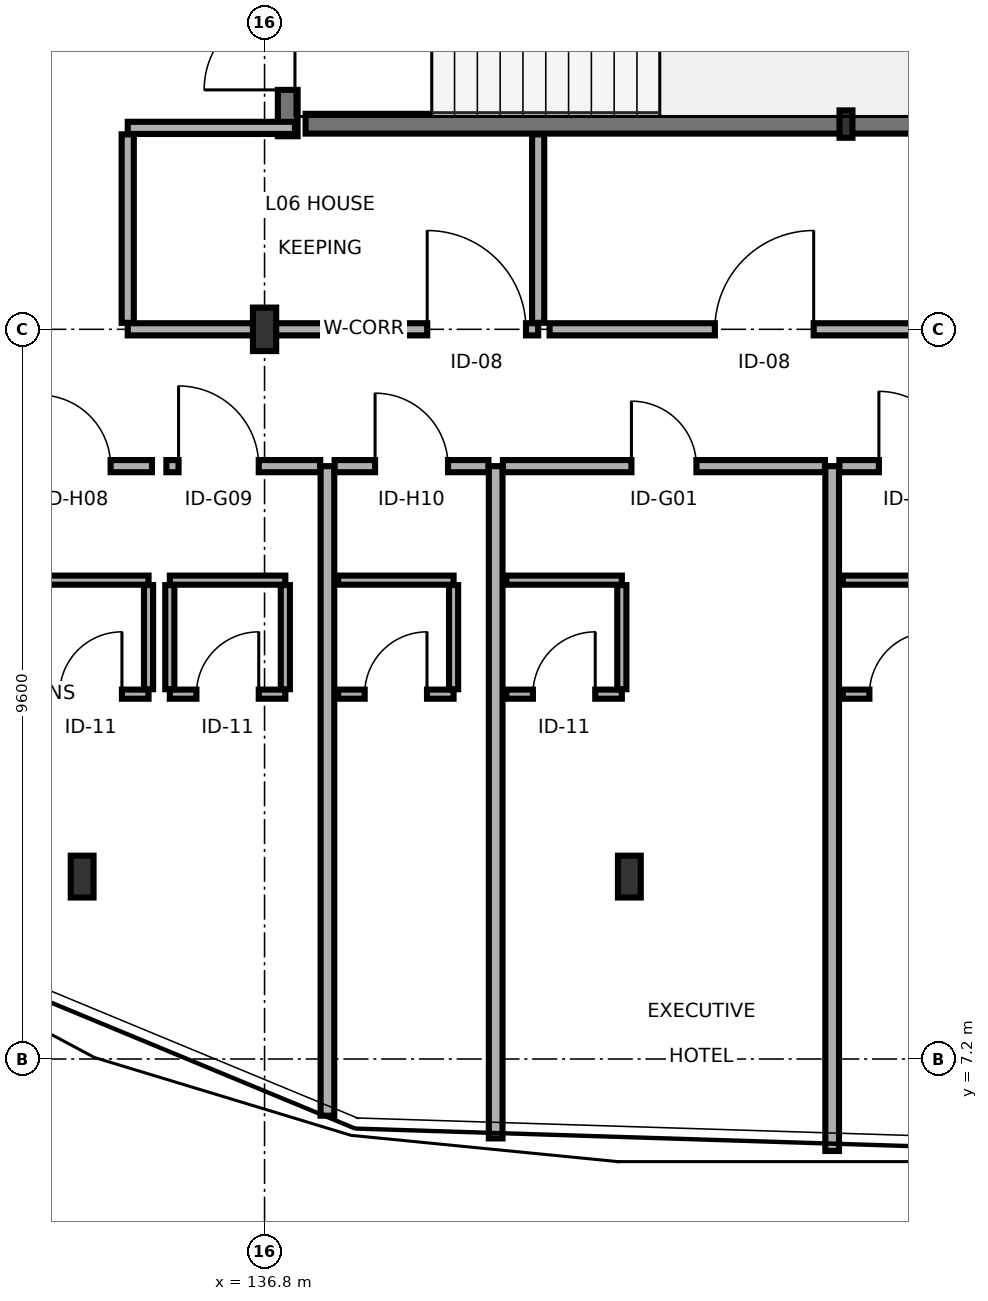
"""IFC4 building model, lengths in metres.
Left out: names, types, materials, properties, quantities, classifications, styles, units other than length and angle.
Written with IfcOpenShell. Run it as: python <this file> out.ifc"""

import sys

from ifc_helpers import new_model, si_unit, direction, frame, frame_2d, origin, origin_2d, place, context, subcontext, project, spatial, rectangle, i_section, extrude, element, fill, save


model = new_model("IFC4")
c1 = context("Model", 3, precision=1e-05, world=origin(), true_north=direction((0.0, 1.0)))
c2 = subcontext(c1, "Body", "Model", "MODEL_VIEW")
j1 = project(units=[si_unit("LENGTHUNIT", "METRE"), si_unit("PLANEANGLEUNIT", "RADIAN")], contexts=[c1])
p1 = place(None, origin())
s1 = spatial("IfcSite", under=j1, at=p1, CompositionType="ELEMENT")
p2 = place(p1, origin())
s2 = spatial("IfcBuilding", under=s1, at=p2, CompositionType="ELEMENT")
p3 = place(p2, frame((0.0, 0.0, 21.5)))
s3 = spatial("IfcBuildingStorey", under=s2, at=p3, CompositionType="ELEMENT", Elevation=21.5)
p4 = place(p3, frame((136.8, 16.8, 0.0), z_axis=(0.0, 0.0, 1.0), x_axis=(1.0, 0.0, 0.0)))
e1 = element("IfcColumn", 1, at=p4, inside=s3, PredefinedType="COLUMN", context=c2, shape_type="SweptSolid", body=[
    extrude(i_section(OverallWidth=0.306, OverallDepth=0.572, WebThickness=0.021, FlangeThickness=0.04, FilletRadius=0.027, at=origin_2d()), origin(), (0.0, 0.0, 1.0), 3.4),
])
p5 = place(p3, frame((144.45, 19.5, 0.0), z_axis=(0.0, 0.0, 1.0), x_axis=(1.0, 0.0, 0.0)))
e2 = element("IfcColumn", 2, at=p5, inside=s3, PredefinedType="PILASTER", context=c2, shape_type="SweptSolid", body=[
    extrude(i_section(OverallWidth=0.17, OverallDepth=0.36, WebThickness=0.008, FlangeThickness=0.013, FilletRadius=0.018, at=origin_2d()), origin(), (0.0, 0.0, 1.0), 3.4),
])
for number, where, z_axis, x_axis in (
    (3, (134.4, 9.6, 0.0), (0.0, 0.0, 1.0), (1.0, 0.0, 0.0)),
    (4, (141.6, 9.6, 0.0), (0.0, 0.0, 1.0), (1.0, 0.0, 0.0)),
):
    element("IfcColumn", number, at=place(p3, frame(where, z_axis=z_axis, x_axis=x_axis)), inside=s3, PredefinedType="COLUMN", context=c2, shape_type="SweptSolid", body=[
        extrude(i_section(OverallWidth=0.3, OverallDepth=0.55, WebThickness=0.015, FlangeThickness=0.029, FilletRadius=0.027, at=origin_2d()), origin(), (0.0, 0.0, 1.0), 3.4),
    ])
p6 = place(p3, frame((137.105, 19.34, 0.0), z_axis=(0.0, 0.0, 1.0), x_axis=(0.0, 1.0, 0.0)))
e5 = element("IfcWall", 5, at=p6, inside=s3, PredefinedType="SHEAR", context=c2, shape_type="SweptSolid", body=[
    extrude(rectangle(XDim=4.27, YDim=0.26, at=frame_2d((2.135, 0.0))), origin(), (0.0, 0.0, 1.0), 3.195),
])
p7 = place(p6, frame((0.61, 0.0, 0.0)))
e6 = element("IfcOpeningElement", 6, at=p7, cuts=e5, PredefinedType="OPENING", context=c2, shape_type="SweptSolid", body=[
    extrude(rectangle(XDim=1.1, YDim=2.2, at=frame_2d((0.55, 1.1))), frame((0.0, 0.14, 0.0), z_axis=(0.0, -1.0, 0.0), x_axis=(1.0, 0.0, 0.0)), (0.0, 0.0, 1.0), 0.28),
])
p8 = place(p3, frame((137.34, 19.505, 0.0), z_axis=(0.0, 0.0, 1.0), x_axis=(1.0, 0.0, 0.0)))
e7 = element("IfcWall", 7, at=p8, inside=s3, PredefinedType="SHEAR", context=c2, shape_type="SweptSolid", body=[
    extrude(rectangle(XDim=8.52, YDim=0.26, at=frame_2d((4.26, 0.0))), origin(), (0.0, 0.0, 1.0), 3.195),
])
p9 = place(p3, frame((135.0, 16.8, 0.0), z_axis=(0.0, 0.0, 1.0), x_axis=(1.0, 0.0, 0.0)))
e8 = element("IfcWall", 8, at=p9, inside=s3, PredefinedType="PARTITIONING", context=c2, shape_type="SweptSolid", body=[
    extrude(rectangle(XDim=5.4, YDim=0.16, at=frame_2d((2.7, 0.0))), origin(), (0.0, 0.0, 1.0), 2.73),
])
p10 = place(p9, frame((3.94, 0.0, 0.0)))
e9 = element("IfcOpeningElement", 9, at=p10, cuts=e8, PredefinedType="OPENING", context=c2, shape_type="SweptSolid", body=[
    extrude(rectangle(XDim=1.3, YDim=2.2, at=frame_2d((0.65, 1.1))), frame((0.0, 0.09, 0.0), z_axis=(0.0, -1.0, 0.0), x_axis=(1.0, 0.0, 0.0)), (0.0, 0.0, 1.0), 0.18),
])
for number, where, z_axis, x_axis in (
    (10, (135.0, 16.885, 0.0), (0.0, 0.0, 1.0), (0.0, 1.0, 0.0)),
    (11, (140.4, 16.885, 0.0), (0.0, 0.0, 1.0), (0.0, 1.0, 0.0)),
):
    element("IfcWall", number, at=place(p3, frame(where, z_axis=z_axis, x_axis=x_axis)), inside=s3, PredefinedType="PARTITIONING", context=c2, shape_type="SweptSolid", body=[
        extrude(rectangle(XDim=2.48, YDim=0.16, at=frame_2d((1.24, 0.0))), origin(), (0.0, 0.0, 1.0), 2.73),
    ])
p11 = place(p3, frame((135.0, 19.45, 0.0), z_axis=(0.0, 0.0, 1.0), x_axis=(1.0, 0.0, 0.0)))
e12 = element("IfcWall", 12, at=p11, inside=s3, PredefinedType="PARTITIONING", context=c2, shape_type="SweptSolid", body=[
    extrude(rectangle(XDim=2.2, YDim=0.16, at=frame_2d((1.1, 0.0))), origin(), (0.0, 0.0, 1.0), 2.73),
])
p12 = place(p3, frame((140.55, 16.8, 0.0), z_axis=(0.0, 0.0, 1.0), x_axis=(1.0, 0.0, 0.0)))
e13 = element("IfcWall", 13, at=p12, inside=s3, PredefinedType="PARTITIONING", context=c2, shape_type="SweptSolid", body=[
    extrude(rectangle(XDim=5.65, YDim=0.16, at=frame_2d((2.825, 0.0))), origin(), (0.0, 0.0, 1.0), 2.73),
])
p13 = place(p12, frame((2.175, 0.0, 0.0)))
e14 = element("IfcOpeningElement", 14, at=p13, cuts=e13, PredefinedType="OPENING", context=c2, shape_type="SweptSolid", body=[
    extrude(rectangle(XDim=1.3, YDim=2.2, at=frame_2d((0.65, 1.1))), frame((0.0, 0.09, 0.0), z_axis=(0.0, -1.0, 0.0), x_axis=(1.0, 0.0, 0.0)), (0.0, 0.0, 1.0), 0.18),
])
p14 = place(p3, frame((133.295, 15.0, 0.0), z_axis=(0.0, 0.0, 1.0), x_axis=(1.0, 0.0, 0.0)))
e15 = element("IfcWall", 15, at=p14, inside=s3, PredefinedType="PARTITIONING", context=c2, shape_type="SweptSolid", body=[
    extrude(rectangle(XDim=2.024, YDim=0.16, at=frame_2d((1.012, 0.0))), origin(), (0.0, 0.0, 1.0), 3.195),
])
p15 = place(p14, frame((0.544, 0.0, 0.0)))
e16 = element("IfcOpeningElement", 16, at=p15, cuts=e15, PredefinedType="OPENING", context=c2, shape_type="SweptSolid", body=[
    extrude(rectangle(XDim=0.936, YDim=2.07, at=frame_2d((0.468, 1.035))), frame((0.0, 0.09, 0.0), z_axis=(0.0, -1.0, 0.0), x_axis=(1.0, 0.0, 0.0)), (0.0, 0.0, 1.0), 0.18),
])
p16 = place(p3, frame((133.754, 12.0, 0.0), z_axis=(0.0, 0.0, 1.0), x_axis=(1.0, 0.0, 0.0)))
e17 = element("IfcWall", 17, at=p16, inside=s3, PredefinedType="PARTITIONING", context=c2, shape_type="SweptSolid", body=[
    extrude(rectangle(XDim=1.52, YDim=0.12, at=frame_2d((0.76, 0.0))), origin(), (0.0, 0.0, 1.0), 2.73),
])
p17 = place(p16, frame((0.35, 0.0, 0.0)))
e18 = element("IfcOpeningElement", 18, at=p17, cuts=e17, PredefinedType="OPENING", context=c2, shape_type="SweptSolid", body=[
    extrude(rectangle(XDim=0.82, YDim=2.08, at=frame_2d((0.41, 1.04))), frame((0.0, 0.07, 0.0), z_axis=(0.0, -1.0, 0.0), x_axis=(1.0, 0.0, 0.0)), (0.0, 0.0, 1.0), 0.14),
])
p18 = place(p3, frame((133.754, 13.5, 0.0), z_axis=(0.0, 0.0, 1.0), x_axis=(1.0, 0.0, 0.0)))
e19 = element("IfcWall", 19, at=p18, inside=s3, PredefinedType="PARTITIONING", context=c2, shape_type="SweptSolid", body=[
    extrude(rectangle(XDim=1.52, YDim=0.12, at=frame_2d((0.76, 0.0))), origin(), (0.0, 0.0, 1.0), 3.195),
])
p19 = place(p3, frame((135.274, 12.065, 0.0), z_axis=(0.0, 0.0, 1.0), x_axis=(0.0, 1.0, 0.0)))
e20 = element("IfcWall", 20, at=p19, inside=s3, PredefinedType="PARTITIONING", context=c2, shape_type="SweptSolid", body=[
    extrude(rectangle(XDim=1.37, YDim=0.12, at=frame_2d((0.685, 0.0))), origin(), (0.0, 0.0, 1.0), 2.73),
])
p20 = place(p3, frame((135.509, 15.0, 0.0), z_axis=(0.0, 0.0, 1.0), x_axis=(1.0, 0.0, 0.0)))
e21 = element("IfcWall", 21, at=p20, inside=s3, PredefinedType="PARTITIONING", context=c2, shape_type="SweptSolid", body=[
    extrude(rectangle(XDim=2.024, YDim=0.16, at=frame_2d((1.012, 0.0))), origin(), (0.0, 0.0, 1.0), 2.73),
])
p21 = place(p20, frame((0.16, 0.0, 0.0)))
e22 = element("IfcOpeningElement", 22, at=p21, cuts=e21, PredefinedType="OPENING", context=c2, shape_type="SweptSolid", body=[
    extrude(rectangle(XDim=1.055, YDim=2.05, at=frame_2d((0.527, 1.025))), frame((0.0, 0.09, 0.0), z_axis=(0.0, -1.0, 0.0), x_axis=(1.0, 0.0, 0.0)), (0.0, 0.0, 1.0), 0.18),
])
p22 = place(p3, frame((135.554, 12.0, 0.0), z_axis=(0.0, 0.0, 1.0), x_axis=(1.0, 0.0, 0.0)))
e23 = element("IfcWall", 23, at=p22, inside=s3, PredefinedType="PARTITIONING", context=c2, shape_type="SweptSolid", body=[
    extrude(rectangle(XDim=1.52, YDim=0.12, at=frame_2d((0.76, 0.0))), origin(), (0.0, 0.0, 1.0), 3.195),
])
p23 = place(p22, frame((0.35, 0.0, 0.0)))
e24 = element("IfcOpeningElement", 24, at=p23, cuts=e23, PredefinedType="OPENING", context=c2, shape_type="SweptSolid", body=[
    extrude(rectangle(XDim=0.82, YDim=2.08, at=frame_2d((0.41, 1.04))), frame((0.0, 0.07, 0.0), z_axis=(0.0, -1.0, 0.0), x_axis=(1.0, 0.0, 0.0)), (0.0, 0.0, 1.0), 0.14),
])
p24 = place(p3, frame((135.554, 13.5, 0.0), z_axis=(0.0, 0.0, 1.0), x_axis=(1.0, 0.0, 0.0)))
e25 = element("IfcWall", 25, at=p24, inside=s3, PredefinedType="PARTITIONING", context=c2, shape_type="SweptSolid", body=[
    extrude(rectangle(XDim=1.52, YDim=0.12, at=frame_2d((0.76, 0.0))), origin(), (0.0, 0.0, 1.0), 2.73),
])
p25 = place(p3, frame((135.554, 12.065, 0.0), z_axis=(0.0, 0.0, 1.0), x_axis=(0.0, 1.0, 0.0)))
e26 = element("IfcWall", 26, at=p25, inside=s3, PredefinedType="PARTITIONING", context=c2, shape_type="SweptSolid", body=[
    extrude(rectangle(XDim=1.37, YDim=0.12, at=frame_2d((0.685, 0.0))), origin(), (0.0, 0.0, 1.0), 2.73),
])
p26 = place(p3, frame((137.073, 12.065, 0.0), z_axis=(0.0, 0.0, 1.0), x_axis=(0.0, 1.0, 0.0)))
e27 = element("IfcWall", 27, at=p26, inside=s3, PredefinedType="PARTITIONING", context=c2, shape_type="SweptSolid", body=[
    extrude(rectangle(XDim=1.37, YDim=0.12, at=frame_2d((0.685, 0.0))), origin(), (0.0, 0.0, 1.0), 3.195),
])
p27 = place(p3, frame((137.627, 6.454, 0.0), z_axis=(0.0, 0.0, 1.0), x_axis=(0.0, 1.0, 0.0)))
e28 = element("IfcWall", 28, at=p27, inside=s3, PredefinedType="PARTITIONING", context=c2, shape_type="SweptSolid", body=[
    extrude(rectangle(XDim=8.546, YDim=0.18, at=frame_2d((4.273, 0.0))), origin(), (0.0, 0.0, 1.0), 2.68),
])
p28 = place(p3, frame((137.722, 15.0, 0.0), z_axis=(0.0, 0.0, 1.0), x_axis=(1.0, 0.0, 0.0)))
e29 = element("IfcWall", 29, at=p28, inside=s3, PredefinedType="PARTITIONING", context=c2, shape_type="SweptSolid", body=[
    extrude(rectangle(XDim=2.023, YDim=0.16, at=frame_2d((1.012, 0.0))), origin(), (0.0, 0.0, 1.0), 3.195),
])
p29 = place(p28, frame((0.532, 0.0, 0.0)))
e30 = element("IfcOpeningElement", 30, at=p29, cuts=e29, PredefinedType="OPENING", context=c2, shape_type="SweptSolid", body=[
    extrude(rectangle(XDim=0.96, YDim=2.13, at=frame_2d((0.48, 1.065))), frame((0.0, 0.09, 0.0), z_axis=(0.0, -1.0, 0.0), x_axis=(1.0, 0.0, 0.0)), (0.0, 0.0, 1.0), 0.18),
])
p30 = place(p3, frame((137.767, 12.0, 0.0), z_axis=(0.0, 0.0, 1.0), x_axis=(1.0, 0.0, 0.0)))
e31 = element("IfcWall", 31, at=p30, inside=s3, PredefinedType="PARTITIONING", context=c2, shape_type="SweptSolid", body=[
    extrude(rectangle(XDim=1.52, YDim=0.12, at=frame_2d((0.76, 0.0))), origin(), (0.0, 0.0, 1.0), 3.195),
])
p31 = place(p30, frame((0.35, 0.0, 0.0)))
e32 = element("IfcOpeningElement", 32, at=p31, cuts=e31, PredefinedType="OPENING", context=c2, shape_type="SweptSolid", body=[
    extrude(rectangle(XDim=0.82, YDim=2.08, at=frame_2d((0.41, 1.04))), frame((0.0, 0.07, 0.0), z_axis=(0.0, -1.0, 0.0), x_axis=(1.0, 0.0, 0.0)), (0.0, 0.0, 1.0), 0.14),
])
p32 = place(p3, frame((137.767, 13.5, 0.0), z_axis=(0.0, 0.0, 1.0), x_axis=(1.0, 0.0, 0.0)))
e33 = element("IfcWall", 33, at=p32, inside=s3, PredefinedType="PARTITIONING", context=c2, shape_type="SweptSolid", body=[
    extrude(rectangle(XDim=1.52, YDim=0.12, at=frame_2d((0.76, 0.0))), origin(), (0.0, 0.0, 1.0), 3.195),
])
p33 = place(p3, frame((139.287, 12.065, 0.0), z_axis=(0.0, 0.0, 1.0), x_axis=(0.0, 1.0, 0.0)))
e34 = element("IfcWall", 34, at=p33, inside=s3, PredefinedType="PARTITIONING", context=c2, shape_type="SweptSolid", body=[
    extrude(rectangle(XDim=1.37, YDim=0.12, at=frame_2d((0.685, 0.0))), origin(), (0.0, 0.0, 1.0), 3.195),
])
p34 = place(p3, frame((139.841, 6.156, 0.0), z_axis=(0.0, 0.0, 1.0), x_axis=(0.0, 1.0, 0.0)))
e35 = element("IfcWall", 35, at=p34, inside=s3, PredefinedType="PARTITIONING", context=c2, shape_type="SweptSolid", body=[
    extrude(rectangle(XDim=8.844, YDim=0.18, at=frame_2d((4.422, 0.0))), origin(), (0.0, 0.0, 1.0), 2.68),
])
p35 = place(p3, frame((139.936, 15.0, 0.0), z_axis=(0.0, 0.0, 1.0), x_axis=(1.0, 0.0, 0.0)))
e36 = element("IfcWall", 36, at=p35, inside=s3, PredefinedType="PARTITIONING", context=c2, shape_type="SweptSolid", body=[
    extrude(rectangle(XDim=4.237, YDim=0.16, at=frame_2d((2.119, 0.0))), origin(), (0.0, 0.0, 1.0), 2.73),
])
p36 = place(p35, frame((1.691, 0.0, 0.0)))
e37 = element("IfcOpeningElement", 37, at=p36, cuts=e36, PredefinedType="OPENING", context=c2, shape_type="SweptSolid", body=[
    extrude(rectangle(XDim=0.855, YDim=2.05, at=frame_2d((0.427, 1.025))), frame((0.0, 0.09, 0.0), z_axis=(0.0, -1.0, 0.0), x_axis=(1.0, 0.0, 0.0)), (0.0, 0.0, 1.0), 0.18),
])
p37 = place(p3, frame((139.981, 12.0, 0.0), z_axis=(0.0, 0.0, 1.0), x_axis=(1.0, 0.0, 0.0)))
e38 = element("IfcWall", 38, at=p37, inside=s3, PredefinedType="PARTITIONING", context=c2, shape_type="SweptSolid", body=[
    extrude(rectangle(XDim=1.52, YDim=0.12, at=frame_2d((0.76, 0.0))), origin(), (0.0, 0.0, 1.0), 2.73),
])
p38 = place(p37, frame((0.35, 0.0, 0.0)))
e39 = element("IfcOpeningElement", 39, at=p38, cuts=e38, PredefinedType="OPENING", context=c2, shape_type="SweptSolid", body=[
    extrude(rectangle(XDim=0.82, YDim=2.08, at=frame_2d((0.41, 1.04))), frame((0.0, 0.07, 0.0), z_axis=(0.0, -1.0, 0.0), x_axis=(1.0, 0.0, 0.0)), (0.0, 0.0, 1.0), 0.14),
])
p39 = place(p3, frame((139.981, 13.5, 0.0), z_axis=(0.0, 0.0, 1.0), x_axis=(1.0, 0.0, 0.0)))
e40 = element("IfcWall", 40, at=p39, inside=s3, PredefinedType="PARTITIONING", context=c2, shape_type="SweptSolid", body=[
    extrude(rectangle(XDim=1.52, YDim=0.12, at=frame_2d((0.76, 0.0))), origin(), (0.0, 0.0, 1.0), 2.73),
])
p40 = place(p3, frame((141.501, 12.065, 0.0), z_axis=(0.0, 0.0, 1.0), x_axis=(0.0, 1.0, 0.0)))
e41 = element("IfcWall", 41, at=p40, inside=s3, PredefinedType="PARTITIONING", context=c2, shape_type="SweptSolid", body=[
    extrude(rectangle(XDim=1.37, YDim=0.12, at=frame_2d((0.685, 0.0))), origin(), (0.0, 0.0, 1.0), 2.73),
])
p41 = place(p3, frame((144.268, 5.99, 0.0), z_axis=(0.0, 0.0, 1.0), x_axis=(0.0, 1.0, 0.0)))
e42 = element("IfcWall", 42, at=p41, inside=s3, PredefinedType="PARTITIONING", context=c2, shape_type="SweptSolid", body=[
    extrude(rectangle(XDim=9.01, YDim=0.18, at=frame_2d((4.505, 0.0))), origin(), (0.0, 0.0, 1.0), 2.68),
])
p42 = place(p3, frame((144.363, 15.0, 0.0), z_axis=(0.0, 0.0, 1.0), x_axis=(1.0, 0.0, 0.0)))
e43 = element("IfcWall", 43, at=p42, inside=s3, PredefinedType="PARTITIONING", context=c2, shape_type="SweptSolid", body=[
    extrude(rectangle(XDim=2.023, YDim=0.16, at=frame_2d((1.012, 0.0))), origin(), (0.0, 0.0, 1.0), 3.195),
])
p43 = place(p42, frame((0.52, 0.0, 0.0)))
e44 = element("IfcOpeningElement", 44, at=p43, cuts=e43, PredefinedType="OPENING", context=c2, shape_type="SweptSolid", body=[
    extrude(rectangle(XDim=0.984, YDim=2.07, at=frame_2d((0.492, 1.035))), frame((0.0, 0.09, 0.0), z_axis=(0.0, -1.0, 0.0), x_axis=(1.0, 0.0, 0.0)), (0.0, 0.0, 1.0), 0.18),
])
p44 = place(p3, frame((144.408, 12.0, 0.0), z_axis=(0.0, 0.0, 1.0), x_axis=(1.0, 0.0, 0.0)))
e45 = element("IfcWall", 45, at=p44, inside=s3, PredefinedType="PARTITIONING", context=c2, shape_type="SweptSolid", body=[
    extrude(rectangle(XDim=1.52, YDim=0.12, at=frame_2d((0.76, 0.0))), origin(), (0.0, 0.0, 1.0), 3.195),
])
p45 = place(p44, frame((0.35, 0.0, 0.0)))
e46 = element("IfcOpeningElement", 46, at=p45, cuts=e45, PredefinedType="OPENING", context=c2, shape_type="SweptSolid", body=[
    extrude(rectangle(XDim=0.82, YDim=2.08, at=frame_2d((0.41, 1.04))), frame((0.0, 0.07, 0.0), z_axis=(0.0, -1.0, 0.0), x_axis=(1.0, 0.0, 0.0)), (0.0, 0.0, 1.0), 0.14),
])
p46 = place(p3, frame((144.408, 13.5, 0.0), z_axis=(0.0, 0.0, 1.0), x_axis=(1.0, 0.0, 0.0)))
e47 = element("IfcWall", 47, at=p46, inside=s3, PredefinedType="PARTITIONING", context=c2, shape_type="SweptSolid", body=[
    extrude(rectangle(XDim=1.52, YDim=0.12, at=frame_2d((0.76, 0.0))), origin(), (0.0, 0.0, 1.0), 3.195),
])
p47 = place(p7, origin())
e48 = element("IfcDoor", 48, at=p47, inside=s3, OperationType="SINGLE_SWING_LEFT", PredefinedType="DOOR", context=c2, shape_type="SweptSolid", body=[
    extrude(rectangle(XDim=1.1, YDim=2.2, at=frame_2d((0.55, 1.1))), frame((0.0, 0.025, 0.0), z_axis=(0.0, -1.0, 0.0), x_axis=(1.0, 0.0, 0.0)), (0.0, 0.0, 1.0), 0.05),
])
fill(e6, e48)
p48 = place(p10, origin())
e49 = element("IfcDoor", 49, at=p48, inside=s3, OperationType="SINGLE_SWING_LEFT", PredefinedType="DOOR", context=c2, shape_type="SweptSolid", body=[
    extrude(rectangle(XDim=1.3, YDim=2.2, at=frame_2d((0.65, 1.1))), frame((0.0, 0.025, 0.0), z_axis=(0.0, -1.0, 0.0), x_axis=(1.0, 0.0, 0.0)), (0.0, 0.0, 1.0), 0.05),
])
fill(e9, e49)
p49 = place(p13, origin())
e50 = element("IfcDoor", 50, at=p49, inside=s3, OperationType="SINGLE_SWING_RIGHT", PredefinedType="DOOR", context=c2, shape_type="SweptSolid", body=[
    extrude(rectangle(XDim=1.3, YDim=2.2, at=frame_2d((0.65, 1.1))), frame((0.0, 0.025, 0.0), z_axis=(0.0, -1.0, 0.0), x_axis=(1.0, 0.0, 0.0)), (0.0, 0.0, 1.0), 0.05),
])
fill(e14, e50)
p50 = place(p15, origin())
e51 = element("IfcDoor", 51, at=p50, inside=s3, OperationType="SINGLE_SWING_LEFT", PredefinedType="DOOR", context=c2, shape_type="SweptSolid", body=[
    extrude(rectangle(XDim=0.936, YDim=2.07, at=frame_2d((0.468, 1.035))), frame((0.0, 0.025, 0.0), z_axis=(0.0, -1.0, 0.0), x_axis=(1.0, 0.0, 0.0)), (0.0, 0.0, 1.0), 0.05),
])
fill(e16, e51)
p51 = place(p17, origin())
e52 = element("IfcDoor", 52, at=p51, inside=s3, OperationType="SINGLE_SWING_RIGHT", PredefinedType="DOOR", context=c2, shape_type="SweptSolid", body=[
    extrude(rectangle(XDim=0.82, YDim=2.08, at=frame_2d((0.41, 1.04))), frame((0.0, 0.025, 0.0), z_axis=(0.0, -1.0, 0.0), x_axis=(1.0, 0.0, 0.0)), (0.0, 0.0, 1.0), 0.05),
])
fill(e18, e52)
p52 = place(p21, origin())
e53 = element("IfcDoor", 53, at=p52, inside=s3, OperationType="SINGLE_SWING_LEFT", PredefinedType="DOOR", context=c2, shape_type="SweptSolid", body=[
    extrude(rectangle(XDim=1.055, YDim=2.05, at=frame_2d((0.527, 1.025))), frame((0.0, 0.025, 0.0), z_axis=(0.0, -1.0, 0.0), x_axis=(1.0, 0.0, 0.0)), (0.0, 0.0, 1.0), 0.05),
])
fill(e22, e53)
p53 = place(p23, origin())
e54 = element("IfcDoor", 54, at=p53, inside=s3, OperationType="SINGLE_SWING_RIGHT", PredefinedType="DOOR", context=c2, shape_type="SweptSolid", body=[
    extrude(rectangle(XDim=0.82, YDim=2.08, at=frame_2d((0.41, 1.04))), frame((0.0, 0.025, 0.0), z_axis=(0.0, -1.0, 0.0), x_axis=(1.0, 0.0, 0.0)), (0.0, 0.0, 1.0), 0.05),
])
fill(e24, e54)
p54 = place(p29, origin())
e55 = element("IfcDoor", 55, at=p54, inside=s3, OperationType="SINGLE_SWING_LEFT", PredefinedType="DOOR", context=c2, shape_type="SweptSolid", body=[
    extrude(rectangle(XDim=0.96, YDim=2.13, at=frame_2d((0.48, 1.065))), frame((0.0, 0.025, 0.0), z_axis=(0.0, -1.0, 0.0), x_axis=(1.0, 0.0, 0.0)), (0.0, 0.0, 1.0), 0.05),
])
fill(e30, e55)
p55 = place(p31, origin())
e56 = element("IfcDoor", 56, at=p55, inside=s3, OperationType="SINGLE_SWING_RIGHT", PredefinedType="DOOR", context=c2, shape_type="SweptSolid", body=[
    extrude(rectangle(XDim=0.82, YDim=2.08, at=frame_2d((0.41, 1.04))), frame((0.0, 0.025, 0.0), z_axis=(0.0, -1.0, 0.0), x_axis=(1.0, 0.0, 0.0)), (0.0, 0.0, 1.0), 0.05),
])
fill(e32, e56)
p56 = place(p36, origin())
e57 = element("IfcDoor", 57, at=p56, inside=s3, OperationType="SINGLE_SWING_LEFT", PredefinedType="DOOR", context=c2, shape_type="SweptSolid", body=[
    extrude(rectangle(XDim=0.855, YDim=2.05, at=frame_2d((0.427, 1.025))), frame((0.0, 0.025, 0.0), z_axis=(0.0, -1.0, 0.0), x_axis=(1.0, 0.0, 0.0)), (0.0, 0.0, 1.0), 0.05),
])
fill(e37, e57)
p57 = place(p38, origin())
e58 = element("IfcDoor", 58, at=p57, inside=s3, OperationType="SINGLE_SWING_RIGHT", PredefinedType="DOOR", context=c2, shape_type="SweptSolid", body=[
    extrude(rectangle(XDim=0.82, YDim=2.08, at=frame_2d((0.41, 1.04))), frame((0.0, 0.025, 0.0), z_axis=(0.0, -1.0, 0.0), x_axis=(1.0, 0.0, 0.0)), (0.0, 0.0, 1.0), 0.05),
])
fill(e39, e58)
p58 = place(p43, origin())
e59 = element("IfcDoor", 59, at=p58, inside=s3, OperationType="SINGLE_SWING_LEFT", PredefinedType="DOOR", context=c2, shape_type="SweptSolid", body=[
    extrude(rectangle(XDim=0.984, YDim=2.07, at=frame_2d((0.492, 1.035))), frame((0.0, 0.025, 0.0), z_axis=(0.0, -1.0, 0.0), x_axis=(1.0, 0.0, 0.0)), (0.0, 0.0, 1.0), 0.05),
])
fill(e44, e59)
p59 = place(p45, origin())
e60 = element("IfcDoor", 60, at=p59, inside=s3, OperationType="SINGLE_SWING_RIGHT", PredefinedType="DOOR", context=c2, shape_type="SweptSolid", body=[
    extrude(rectangle(XDim=0.82, YDim=2.08, at=frame_2d((0.41, 1.04))), frame((0.0, 0.025, 0.0), z_axis=(0.0, -1.0, 0.0), x_axis=(1.0, 0.0, 0.0)), (0.0, 0.0, 1.0), 0.05),
])
fill(e46, e60)
save(model, sys.argv[1])
